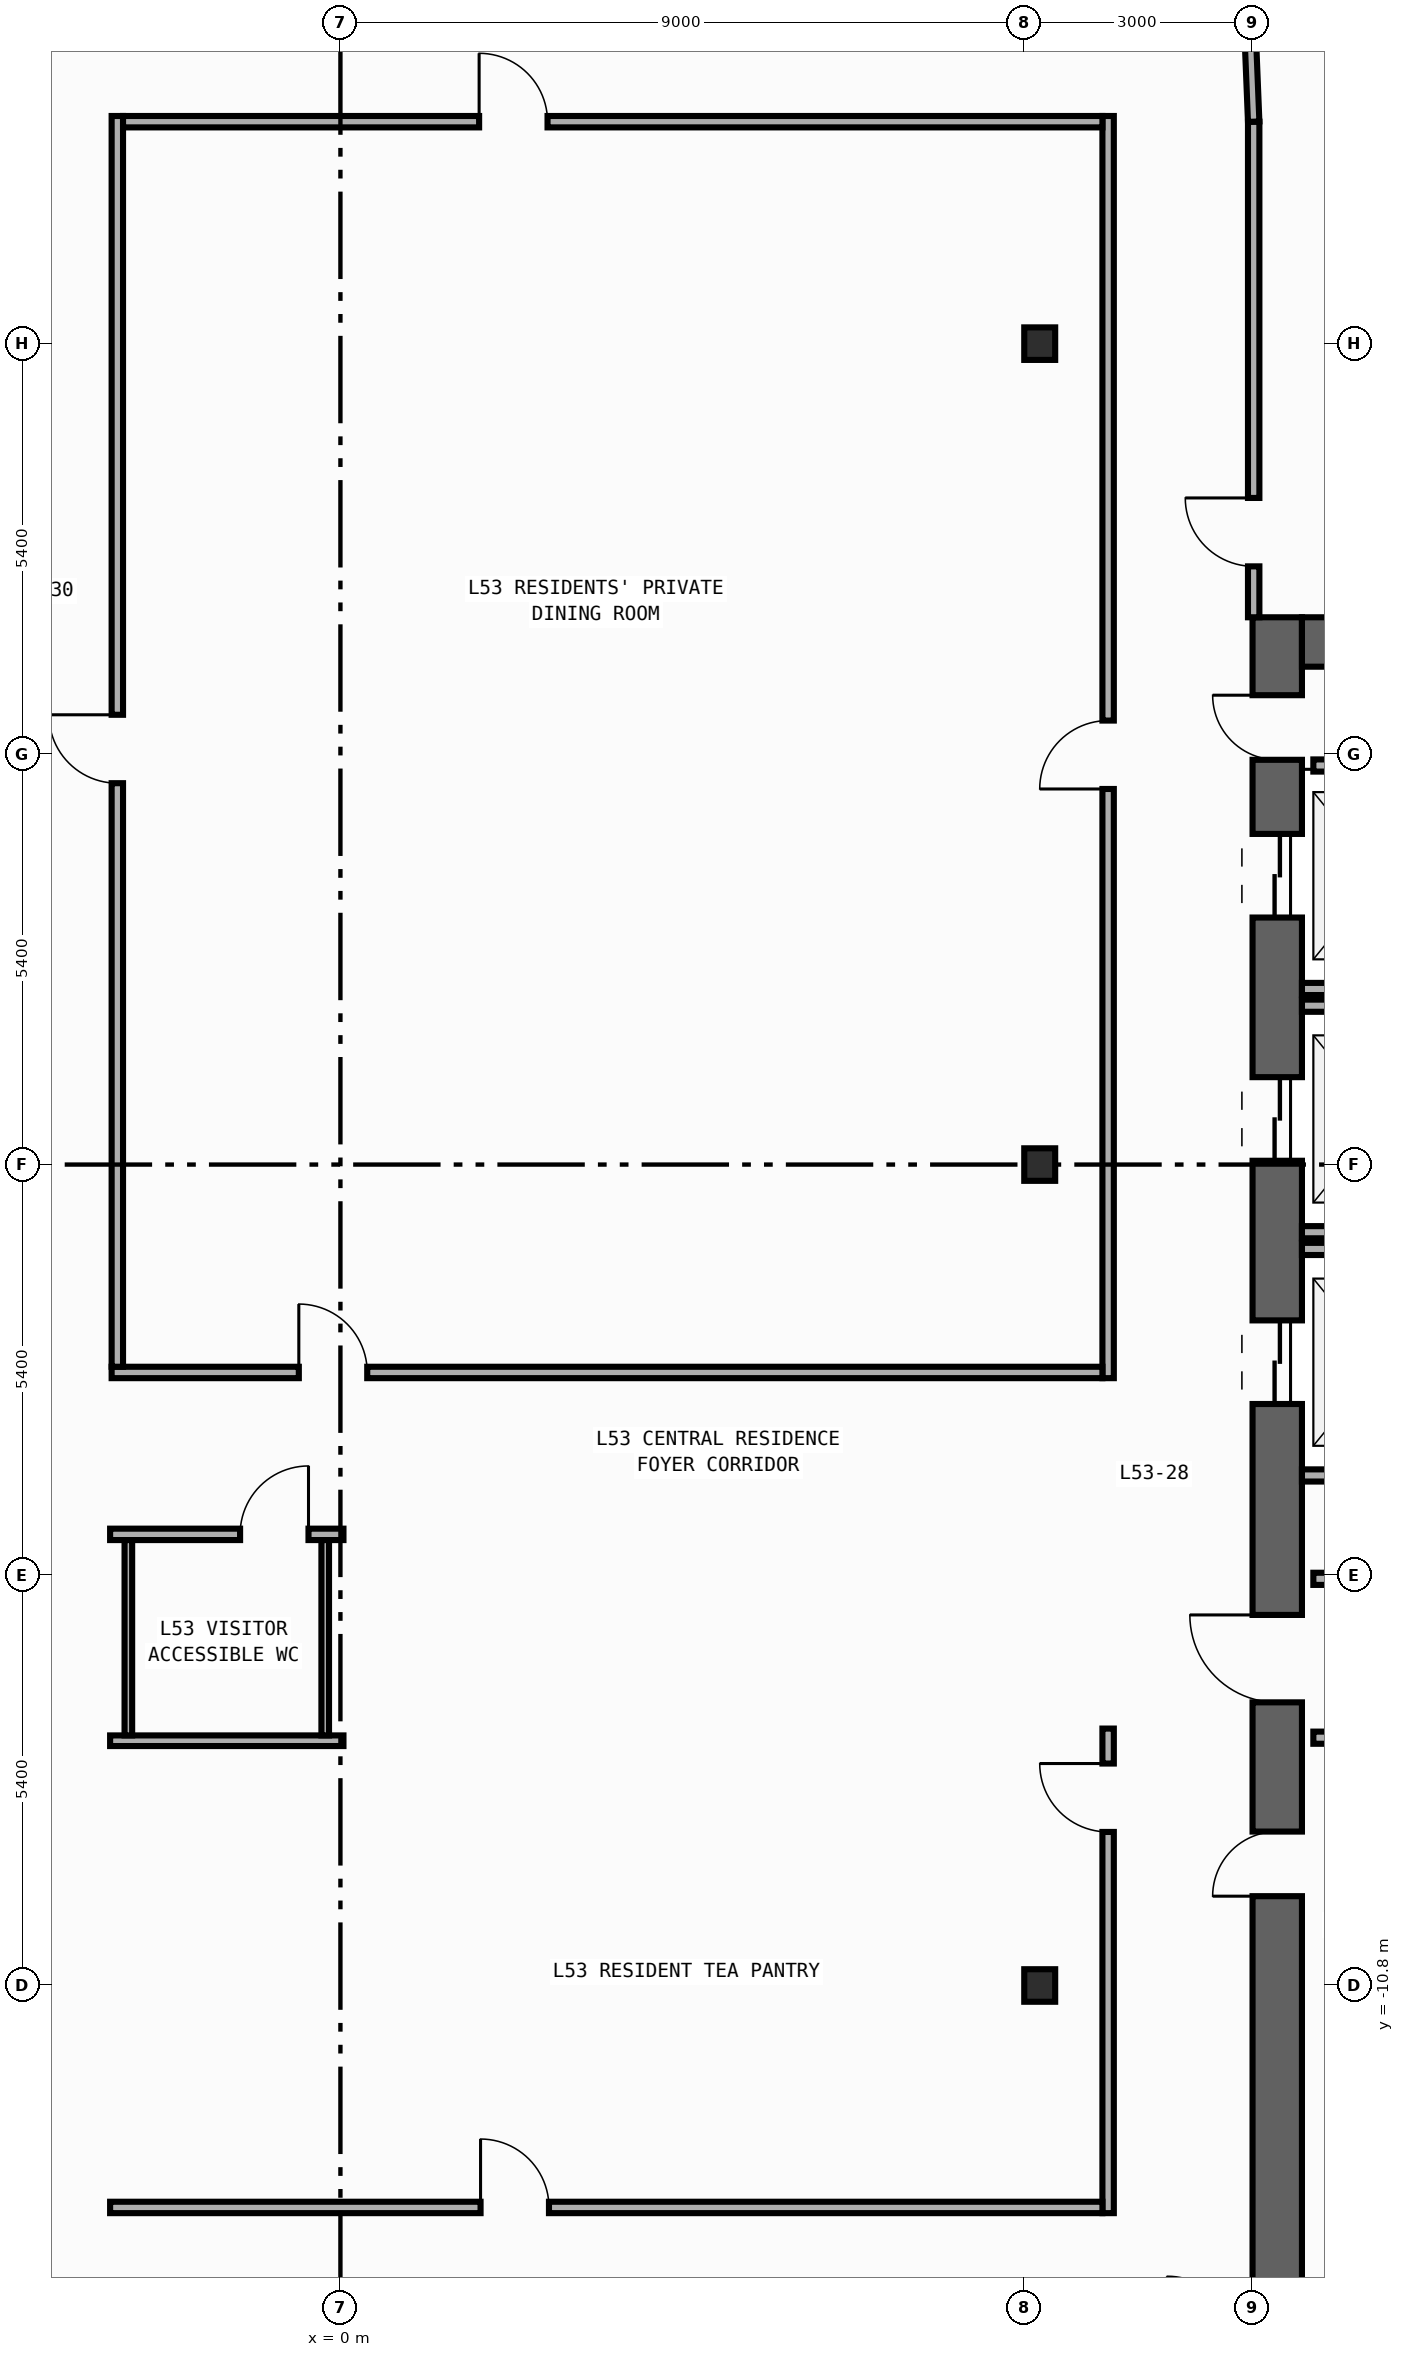
"""IFC4 building model, lengths in metres.
Left out: names, types, materials, properties, quantities, classifications, styles, units other than length and angle.
Written with IfcOpenShell. Run it as: python <this file> out.ifc"""

import sys

from ifc_helpers import new_model, si_unit, direction, frame, frame_2d, origin, origin_2d, place, context, subcontext, project, spatial, rectangle, i_section, extrude, element, fill, save


model = new_model("IFC4")
c1 = context("Model", 3, precision=1e-05, world=origin(), true_north=direction((0.0, 1.0)))
c2 = subcontext(c1, "Body", "Model", "MODEL_VIEW")
j1 = project(units=[si_unit("LENGTHUNIT", "METRE"), si_unit("PLANEANGLEUNIT", "RADIAN")], contexts=[c1])
p1 = place(None, origin())
s1 = spatial("IfcSite", under=j1, at=p1, CompositionType="ELEMENT")
p2 = place(p1, origin())
s2 = spatial("IfcBuilding", under=s1, at=p2, CompositionType="ELEMENT")
p3 = place(p2, frame((0.0, 0.0, 229.6)))
s3 = spatial("IfcBuildingStorey", under=s2, at=p3, CompositionType="ELEMENT", Elevation=229.6)
p4 = place(p3, frame((12.325, -19.8, 0.0), z_axis=(0.0, 0.0, 1.0), x_axis=(0.0, 1.0, 0.0)))
e1 = element("IfcWall", 1, at=p4, inside=s3, PredefinedType="SHEAR", context=c2, shape_type="SweptSolid", body=[
    extrude(rectangle(XDim=27.0, YDim=0.65, at=frame_2d((13.5, 0.0))), origin(), (0.0, 0.0, 1.0), 3.34),
])
p5 = place(p4, frame((23.05, 0.0, 0.0)))
e2 = element("IfcOpeningElement", 2, at=p5, cuts=e1, PredefinedType="OPENING", context=c2, shape_type="SweptSolid", body=[
    extrude(rectangle(XDim=1.1, YDim=2.2, at=frame_2d((0.55, 1.1))), frame((0.0, 0.335, 0.0), z_axis=(0.0, -1.0, 0.0), x_axis=(1.0, 0.0, 0.0)), (0.0, 0.0, 1.0), 0.67),
])
p6 = place(p4, frame((19.85, 0.0, 0.0)))
e3 = element("IfcOpeningElement", 3, at=p6, cuts=e1, PredefinedType="OPENING", context=c2, shape_type="SweptSolid", body=[
    extrude(rectangle(XDim=1.1, YDim=2.2, at=frame_2d((0.55, 1.1))), frame((0.0, 0.335, 0.0), z_axis=(0.0, -1.0, 0.0), x_axis=(1.0, 0.0, 0.0)), (0.0, 0.0, 1.0), 0.67),
])
p7 = place(p4, frame((16.65, 0.0, 0.0)))
e4 = element("IfcOpeningElement", 4, at=p7, cuts=e1, PredefinedType="OPENING", context=c2, shape_type="SweptSolid", body=[
    extrude(rectangle(XDim=1.1, YDim=2.2, at=frame_2d((0.55, 1.1))), frame((0.0, 0.335, 0.0), z_axis=(0.0, -1.0, 0.0), x_axis=(1.0, 0.0, 0.0)), (0.0, 0.0, 1.0), 0.67),
])
p8 = place(p4, frame((10.175, 0.0, 0.0)))
e5 = element("IfcOpeningElement", 5, at=p8, cuts=e1, PredefinedType="OPENING", context=c2, shape_type="SweptSolid", body=[
    extrude(rectangle(XDim=0.85, YDim=2.1, at=frame_2d((0.425, 1.05))), frame((0.0, 0.335, 0.0), z_axis=(0.0, -1.0, 0.0), x_axis=(1.0, 0.0, 0.0)), (0.0, 0.0, 1.0), 0.67),
])
p9 = place(p4, frame((12.725, 0.0, 0.0)))
e6 = element("IfcOpeningElement", 6, at=p9, cuts=e1, PredefinedType="OPENING", context=c2, shape_type="SweptSolid", body=[
    extrude(rectangle(XDim=1.15, YDim=2.2, at=frame_2d((0.575, 1.1))), frame((0.0, 0.335, 0.0), z_axis=(0.0, -1.0, 0.0), x_axis=(1.0, 0.0, 0.0)), (0.0, 0.0, 1.0), 0.67),
])
p10 = place(p4, frame((25.125, 0.0, 0.0)))
e7 = element("IfcOpeningElement", 7, at=p10, cuts=e1, PredefinedType="OPENING", context=c2, shape_type="SweptSolid", body=[
    extrude(rectangle(XDim=0.85, YDim=2.1, at=frame_2d((0.425, 1.05))), frame((0.0, 0.335, 0.0), z_axis=(0.0, -1.0, 0.0), x_axis=(1.0, 0.0, 0.0)), (0.0, 0.0, 1.0), 0.67),
])
p11 = place(p3, frame((12.65, 6.875, 0.0), z_axis=(0.0, 0.0, 1.0), x_axis=(1.0, 0.0, 0.0)))
e8 = element("IfcWall", 8, at=p11, inside=s3, PredefinedType="SHEAR", context=c2, shape_type="SweptSolid", body=[
    extrude(rectangle(XDim=7.1, YDim=0.65, at=frame_2d((3.55, 0.0))), origin(), (0.0, 0.0, 1.0), 3.34),
])
for number, where, z_axis, x_axis in (
    (9, (9.2, -10.8, 0.0), (0.0, 0.0, 1.0), (1.0, 0.0, 0.0)),
    (10, (9.2, 0.0, 0.0), (0.0, 0.0, 1.0), (1.0, 0.0, 0.0)),
    (11, (9.2, 10.8, 0.0), (0.0, 0.0, 1.0), (1.0, 0.0, 0.0)),
):
    element("IfcColumn", number, at=place(p3, frame(where, z_axis=z_axis, x_axis=x_axis)), inside=s3, PredefinedType="COLUMN", context=c2, shape_type="SweptSolid", body=[
        extrude(i_section(OverallWidth=0.407, OverallDepth=0.428, WebThickness=0.02, FlangeThickness=0.035, FilletRadius=0.022, at=origin_2d()), origin(), (0.0, 0.0, 1.0), 3.6),
    ])
for number, where, z_axis, x_axis in (
    (12, (12.65, 2.31, 0.0), (0.0, 0.0, 1.0), (1.0, 0.0, 0.0)),
    (13, (12.65, -0.89, 0.0), (0.0, 0.0, 1.0), (1.0, 0.0, 0.0)),
    (14, (12.65, 2.09, 0.0), (0.0, 0.0, 1.0), (1.0, 0.0, 0.0)),
    (15, (12.65, -4.09, 0.0), (0.0, 0.0, 1.0), (1.0, 0.0, 0.0)),
    (16, (12.65, -1.11, 0.0), (0.0, 0.0, 1.0), (1.0, 0.0, 0.0)),
):
    element("IfcWall", number, at=place(p3, frame(where, z_axis=z_axis, x_axis=x_axis)), inside=s3, PredefinedType="STANDARD", context=c2, shape_type="SweptSolid", body=[
        extrude(rectangle(XDim=2.34, YDim=0.16, at=frame_2d((1.17, 0.0))), origin(), (0.0, 0.0, 1.0), 3.34),
    ])
for number, where, z_axis, x_axis in (
    (17, (12.8, -5.45, 0.0), (0.0, 0.0, 1.0), (1.0, 0.0, 0.0)),
    (18, (12.8, -7.54, 0.0), (0.0, 0.0, 1.0), (1.0, 0.0, 0.0)),
    (19, (12.8, 5.25, 0.0), (0.0, 0.0, 1.0), (1.0, 0.0, 0.0)),
):
    element("IfcWall", number, at=place(p3, frame(where, z_axis=z_axis, x_axis=x_axis)), inside=s3, PredefinedType="STANDARD", context=c2, shape_type="SweptSolid", body=[
        extrude(rectangle(XDim=2.6, YDim=0.16, at=frame_2d((1.3, 0.0))), origin(), (0.0, 0.0, 1.0), 3.34),
    ])
p12 = place(p3, frame((12.015, 7.2, 0.0), z_axis=(0.0, 0.0, 1.0), x_axis=(0.0, 1.0, 0.0)))
e20 = element("IfcWall", 20, at=p12, inside=s3, PredefinedType="PARTITIONING", context=c2, shape_type="SweptSolid", body=[
    extrude(rectangle(XDim=6.52, YDim=0.15, at=frame_2d((3.26, 0.0))), origin(), (0.0, 0.0, 1.0), 3.34),
])
p13 = place(p12, frame((0.67, 0.0, 0.0)))
e21 = element("IfcOpeningElement", 21, at=p13, cuts=e20, PredefinedType="OPENING", context=c2, shape_type="SweptSolid", body=[
    extrude(rectangle(XDim=0.9, YDim=2.15, at=frame_2d((0.45, 1.075))), frame((0.0, 0.085, 0.0), z_axis=(0.0, -1.0, 0.0), x_axis=(1.0, 0.0, 0.0)), (0.0, 0.0, 1.0), 0.17),
])
p14 = place(p3, frame((10.1, -2.81, 0.0), z_axis=(0.0, 0.0, 1.0), x_axis=(0.0, 1.0, 0.0)))
e22 = element("IfcWall", 22, at=p14, inside=s3, PredefinedType="PARTITIONING", context=c2, shape_type="SweptSolid", body=[
    extrude(rectangle(XDim=16.605, YDim=0.15, at=frame_2d((8.302, 0.0))), origin(), (0.0, 0.0, 1.0), 3.34),
])
p15 = place(p14, frame((7.751, 0.0, 0.0)))
e23 = element("IfcOpeningElement", 23, at=p15, cuts=e22, PredefinedType="OPENING", context=c2, shape_type="SweptSolid", body=[
    extrude(rectangle(XDim=0.9, YDim=2.15, at=frame_2d((0.45, 1.075))), frame((0.0, 0.085, 0.0), z_axis=(0.0, -1.0, 0.0), x_axis=(1.0, 0.0, 0.0)), (0.0, 0.0, 1.0), 0.17),
])
p16 = place(p3, frame((10.1, -13.795, 0.0), z_axis=(0.0, 0.0, 1.0), x_axis=(0.0, 1.0, 0.0)))
e24 = element("IfcWall", 24, at=p16, inside=s3, PredefinedType="PARTITIONING", context=c2, shape_type="SweptSolid", body=[
    extrude(rectangle(XDim=6.375, YDim=0.15, at=frame_2d((3.188, 0.0))), origin(), (0.0, 0.0, 1.0), 3.34),
])
p17 = place(p16, frame((5.015, 0.0, 0.0)))
e25 = element("IfcOpeningElement", 25, at=p17, cuts=e24, PredefinedType="OPENING", context=c2, shape_type="SweptSolid", body=[
    extrude(rectangle(XDim=0.9, YDim=2.15, at=frame_2d((0.45, 1.075))), frame((0.0, 0.085, 0.0), z_axis=(0.0, -1.0, 0.0), x_axis=(1.0, 0.0, 0.0)), (0.0, 0.0, 1.0), 0.17),
])
p18 = place(p3, frame((-3.01, -2.735, 0.0), z_axis=(0.0, 0.0, 1.0), x_axis=(1.0, 0.0, 0.0)))
e26 = element("IfcWall", 26, at=p18, inside=s3, PredefinedType="PARTITIONING", context=c2, shape_type="SweptSolid", body=[
    extrude(rectangle(XDim=13.035, YDim=0.15, at=frame_2d((6.518, 0.0))), origin(), (0.0, 0.0, 1.0), 3.34),
])
p19 = place(p18, frame((2.463, 0.0, 0.0)))
e27 = element("IfcOpeningElement", 27, at=p19, cuts=e26, PredefinedType="OPENING", context=c2, shape_type="SweptSolid", body=[
    extrude(rectangle(XDim=0.9, YDim=2.15, at=frame_2d((0.45, 1.075))), frame((0.0, 0.085, 0.0), z_axis=(0.0, -1.0, 0.0), x_axis=(1.0, 0.0, 0.0)), (0.0, 0.0, 1.0), 0.17),
])
p20 = place(p3, frame((-3.03, -4.865, 0.0), z_axis=(0.0, 0.0, 1.0), x_axis=(1.0, 0.0, 0.0)))
e28 = element("IfcWall", 28, at=p20, inside=s3, PredefinedType="PARTITIONING", context=c2, shape_type="SweptSolid", body=[
    extrude(rectangle(XDim=3.07, YDim=0.15, at=frame_2d((1.535, 0.0))), origin(), (0.0, 0.0, 1.0), 3.34),
])
p21 = place(p20, frame((1.71, 0.0, 0.0)))
e29 = element("IfcOpeningElement", 29, at=p21, cuts=e28, PredefinedType="OPENING", context=c2, shape_type="SweptSolid", body=[
    extrude(rectangle(XDim=0.9, YDim=2.15, at=frame_2d((0.45, 1.075))), frame((0.0, 0.085, 0.0), z_axis=(0.0, -1.0, 0.0), x_axis=(1.0, 0.0, 0.0)), (0.0, 0.0, 1.0), 0.17),
])
p22 = place(p3, frame((-2.935, -2.66, 0.0), z_axis=(0.0, 0.0, 1.0), x_axis=(0.0, 1.0, 0.0)))
e30 = element("IfcWall", 30, at=p22, inside=s3, PredefinedType="PARTITIONING", context=c2, shape_type="SweptSolid", body=[
    extrude(rectangle(XDim=16.455, YDim=0.15, at=frame_2d((8.228, 0.0))), origin(), (0.0, 0.0, 1.0), 3.34),
])
p23 = place(p22, frame((7.677, 0.0, 0.0)))
e31 = element("IfcOpeningElement", 31, at=p23, cuts=e30, PredefinedType="OPENING", context=c2, shape_type="SweptSolid", body=[
    extrude(rectangle(XDim=0.9, YDim=2.15, at=frame_2d((0.45, 1.075))), frame((0.0, 0.085, 0.0), z_axis=(0.0, -1.0, 0.0), x_axis=(1.0, 0.0, 0.0)), (0.0, 0.0, 1.0), 0.17),
])
p24 = place(p3, frame((12.015, 13.72, 0.0), z_axis=(0.0, 0.0, 1.0), x_axis=(-0.040046877756, 0.99919780203, 0.0)))
e32 = element("IfcWall", 32, at=p24, inside=s3, PredefinedType="PARTITIONING", context=c2, shape_type="SweptSolid", body=[
    extrude(rectangle(XDim=1.731, YDim=0.15, at=frame_2d((0.866, 0.0))), origin(), (0.0, 0.0, 1.0), 3.34),
])
p25 = place(p3, frame((-2.86, 13.72, 0.0), z_axis=(0.0, 0.0, 1.0), x_axis=(1.0, 0.0, 0.0)))
e33 = element("IfcWall", 33, at=p25, inside=s3, PredefinedType="PARTITIONING", context=c2, shape_type="SweptSolid", body=[
    extrude(rectangle(XDim=12.885, YDim=0.15, at=frame_2d((6.442, 0.0))), origin(), (0.0, 0.0, 1.0), 3.34),
])
p26 = place(p25, frame((4.685, 0.0, 0.0)))
e34 = element("IfcOpeningElement", 34, at=p26, cuts=e33, PredefinedType="OPENING", context=c2, shape_type="SweptSolid", body=[
    extrude(rectangle(XDim=0.9, YDim=2.15, at=frame_2d((0.45, 1.075))), frame((0.0, 0.085, 0.0), z_axis=(0.0, -1.0, 0.0), x_axis=(1.0, 0.0, 0.0)), (0.0, 0.0, 1.0), 0.17),
])
p27 = place(p3, frame((-3.03, -13.72, 0.0), z_axis=(0.0, 0.0, 1.0), x_axis=(1.0, 0.0, 0.0)))
e35 = element("IfcWall", 35, at=p27, inside=s3, PredefinedType="PARTITIONING", context=c2, shape_type="SweptSolid", body=[
    extrude(rectangle(XDim=13.055, YDim=0.15, at=frame_2d((6.527, 0.0))), origin(), (0.0, 0.0, 1.0), 3.34),
])
p28 = place(p27, frame((4.874, 0.0, 0.0)))
e36 = element("IfcOpeningElement", 36, at=p28, cuts=e35, PredefinedType="OPENING", context=c2, shape_type="SweptSolid", body=[
    extrude(rectangle(XDim=0.9, YDim=2.15, at=frame_2d((0.45, 1.075))), frame((0.0, 0.085, 0.0), z_axis=(0.0, -1.0, 0.0), x_axis=(1.0, 0.0, 0.0)), (0.0, 0.0, 1.0), 0.17),
])
p29 = place(p3, frame((-3.03, -7.58, 0.0), z_axis=(0.0, 0.0, 1.0), x_axis=(1.0, 0.0, 0.0)))
e37 = element("IfcWall", 37, at=p29, inside=s3, PredefinedType="PARTITIONING", context=c2, shape_type="SweptSolid", body=[
    extrude(rectangle(XDim=3.07, YDim=0.14, at=frame_2d((1.535, 0.0))), origin(), (0.0, 0.0, 1.0), 3.34),
])
for number, where, z_axis, x_axis in (
    (38, (-0.2, -4.94, 0.0), (0.0, 0.0, 1.0), (0.0, -1.0, 0.0)),
    (39, (-2.79, -7.51, 0.0), (0.0, 0.0, 1.0), (0.0, 1.0, 0.0)),
):
    element("IfcWall", number, at=place(p3, frame(where, z_axis=z_axis, x_axis=x_axis)), inside=s3, PredefinedType="PARTITIONING", context=c2, shape_type="SweptSolid", body=[
        extrude(rectangle(XDim=2.57, YDim=0.1, at=frame_2d((1.285, 0.0))), origin(), (0.0, 0.0, 1.0), 3.34),
    ])
p30 = place(p5, origin())
e40 = element("IfcDoor", 40, at=p30, inside=s3, OperationType="DOUBLE_DOOR_SLIDING", PredefinedType="DOOR", context=c2, shape_type="SweptSolid", body=[
    extrude(rectangle(XDim=1.1, YDim=2.2, at=frame_2d((0.55, 1.1))), frame((0.0, 0.025, 0.0), z_axis=(0.0, -1.0, 0.0), x_axis=(1.0, 0.0, 0.0)), (0.0, 0.0, 1.0), 0.05),
])
fill(e2, e40)
p31 = place(p6, origin())
e41 = element("IfcDoor", 41, at=p31, inside=s3, OperationType="DOUBLE_DOOR_SLIDING", PredefinedType="DOOR", context=c2, shape_type="SweptSolid", body=[
    extrude(rectangle(XDim=1.1, YDim=2.2, at=frame_2d((0.55, 1.1))), frame((0.0, 0.025, 0.0), z_axis=(0.0, -1.0, 0.0), x_axis=(1.0, 0.0, 0.0)), (0.0, 0.0, 1.0), 0.05),
])
fill(e3, e41)
p32 = place(p7, origin())
e42 = element("IfcDoor", 42, at=p32, inside=s3, OperationType="DOUBLE_DOOR_SLIDING", PredefinedType="DOOR", context=c2, shape_type="SweptSolid", body=[
    extrude(rectangle(XDim=1.1, YDim=2.2, at=frame_2d((0.55, 1.1))), frame((0.0, 0.025, 0.0), z_axis=(0.0, -1.0, 0.0), x_axis=(1.0, 0.0, 0.0)), (0.0, 0.0, 1.0), 0.05),
])
fill(e4, e42)
p33 = place(p8, origin())
e43 = element("IfcDoor", 43, at=p33, inside=s3, OperationType="SINGLE_SWING_LEFT", PredefinedType="DOOR", context=c2, shape_type="SweptSolid", body=[
    extrude(rectangle(XDim=0.85, YDim=2.1, at=frame_2d((0.425, 1.05))), frame((0.0, 0.025, 0.0), z_axis=(0.0, -1.0, 0.0), x_axis=(1.0, 0.0, 0.0)), (0.0, 0.0, 1.0), 0.05),
])
fill(e5, e43)
p34 = place(p9, origin())
e44 = element("IfcDoor", 44, at=p34, inside=s3, OperationType="SINGLE_SWING_RIGHT", PredefinedType="DOOR", context=c2, shape_type="SweptSolid", body=[
    extrude(rectangle(XDim=1.15, YDim=2.2, at=frame_2d((0.575, 1.1))), frame((0.0, 0.025, 0.0), z_axis=(0.0, -1.0, 0.0), x_axis=(1.0, 0.0, 0.0)), (0.0, 0.0, 1.0), 0.05),
])
fill(e6, e44)
p35 = place(p10, origin())
e45 = element("IfcDoor", 45, at=p35, inside=s3, OperationType="SINGLE_SWING_RIGHT", PredefinedType="DOOR", context=c2, shape_type="SweptSolid", body=[
    extrude(rectangle(XDim=0.85, YDim=2.1, at=frame_2d((0.425, 1.05))), frame((0.0, 0.025, 0.0), z_axis=(0.0, -1.0, 0.0), x_axis=(1.0, 0.0, 0.0)), (0.0, 0.0, 1.0), 0.05),
])
fill(e7, e45)
p36 = place(p13, origin())
e46 = element("IfcDoor", 46, at=p36, inside=s3, OperationType="SINGLE_SWING_RIGHT", PredefinedType="DOOR", context=c2, shape_type="SweptSolid", body=[
    extrude(rectangle(XDim=0.9, YDim=2.15, at=frame_2d((0.45, 1.075))), frame((0.0, 0.025, 0.0), z_axis=(0.0, -1.0, 0.0), x_axis=(1.0, 0.0, 0.0)), (0.0, 0.0, 1.0), 0.05),
])
fill(e21, e46)
p37 = place(p15, origin())
e47 = element("IfcDoor", 47, at=p37, inside=s3, OperationType="SINGLE_SWING_LEFT", PredefinedType="DOOR", context=c2, shape_type="SweptSolid", body=[
    extrude(rectangle(XDim=0.9, YDim=2.15, at=frame_2d((0.45, 1.075))), frame((0.0, 0.025, 0.0), z_axis=(0.0, -1.0, 0.0), x_axis=(1.0, 0.0, 0.0)), (0.0, 0.0, 1.0), 0.05),
])
fill(e23, e47)
p38 = place(p17, origin())
e48 = element("IfcDoor", 48, at=p38, inside=s3, OperationType="SINGLE_SWING_RIGHT", PredefinedType="DOOR", context=c2, shape_type="SweptSolid", body=[
    extrude(rectangle(XDim=0.9, YDim=2.15, at=frame_2d((0.45, 1.075))), frame((0.0, 0.025, 0.0), z_axis=(0.0, -1.0, 0.0), x_axis=(1.0, 0.0, 0.0)), (0.0, 0.0, 1.0), 0.05),
])
fill(e25, e48)
p39 = place(p19, origin())
e49 = element("IfcDoor", 49, at=p39, inside=s3, OperationType="SINGLE_SWING_LEFT", PredefinedType="DOOR", context=c2, shape_type="SweptSolid", body=[
    extrude(rectangle(XDim=0.9, YDim=2.15, at=frame_2d((0.45, 1.075))), frame((0.0, 0.025, 0.0), z_axis=(0.0, -1.0, 0.0), x_axis=(1.0, 0.0, 0.0)), (0.0, 0.0, 1.0), 0.05),
])
fill(e27, e49)
p40 = place(p21, origin())
e50 = element("IfcDoor", 50, at=p40, inside=s3, OperationType="SINGLE_SWING_RIGHT", PredefinedType="DOOR", context=c2, shape_type="SweptSolid", body=[
    extrude(rectangle(XDim=0.9, YDim=2.15, at=frame_2d((0.45, 1.075))), frame((0.0, 0.025, 0.0), z_axis=(0.0, -1.0, 0.0), x_axis=(1.0, 0.0, 0.0)), (0.0, 0.0, 1.0), 0.05),
])
fill(e29, e50)
p41 = place(p23, origin())
e51 = element("IfcDoor", 51, at=p41, inside=s3, OperationType="SINGLE_SWING_RIGHT", PredefinedType="DOOR", context=c2, shape_type="SweptSolid", body=[
    extrude(rectangle(XDim=0.9, YDim=2.15, at=frame_2d((0.45, 1.075))), frame((0.0, 0.025, 0.0), z_axis=(0.0, -1.0, 0.0), x_axis=(1.0, 0.0, 0.0)), (0.0, 0.0, 1.0), 0.05),
])
fill(e31, e51)
p42 = place(p26, origin())
e52 = element("IfcDoor", 52, at=p42, inside=s3, OperationType="SINGLE_SWING_LEFT", PredefinedType="DOOR", context=c2, shape_type="SweptSolid", body=[
    extrude(rectangle(XDim=0.9, YDim=2.15, at=frame_2d((0.45, 1.075))), frame((0.0, 0.025, 0.0), z_axis=(0.0, -1.0, 0.0), x_axis=(1.0, 0.0, 0.0)), (0.0, 0.0, 1.0), 0.05),
])
fill(e34, e52)
p43 = place(p28, origin())
e53 = element("IfcDoor", 53, at=p43, inside=s3, OperationType="SINGLE_SWING_LEFT", PredefinedType="DOOR", context=c2, shape_type="SweptSolid", body=[
    extrude(rectangle(XDim=0.9, YDim=2.15, at=frame_2d((0.45, 1.075))), frame((0.0, 0.025, 0.0), z_axis=(0.0, -1.0, 0.0), x_axis=(1.0, 0.0, 0.0)), (0.0, 0.0, 1.0), 0.05),
])
fill(e36, e53)
save(model, sys.argv[1])
